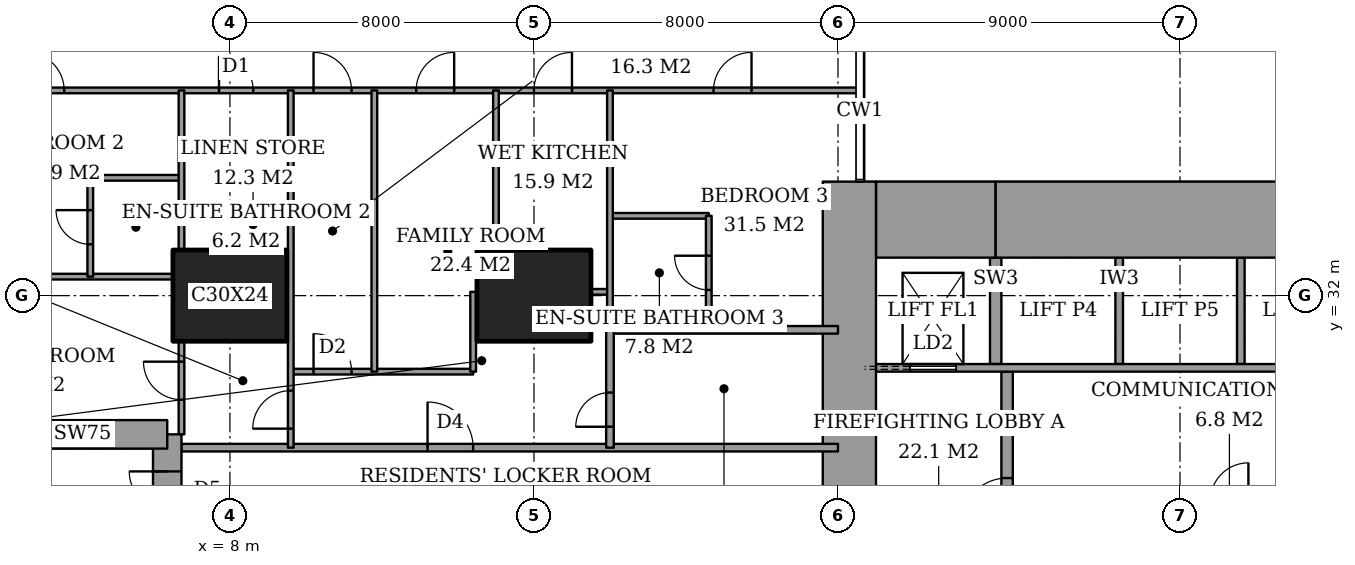
"""IFC4 building model, lengths in metres.
Left out: names, types, materials, properties, quantities, classifications, styles, units other than length and angle.
Written with IfcOpenShell. Run it as: python <this file> out.ifc"""

import sys

from ifc_helpers import new_model, si_unit, direction, frame, frame_2d, origin, origin_2d, place, context, subcontext, project, spatial, rectangle, extrude, element, fill, save


model = new_model("IFC4")
c1 = context("Model", 3, precision=1e-05, world=origin(), true_north=direction((0.0, 1.0)))
c2 = subcontext(c1, "Body", "Model", "MODEL_VIEW")
j1 = project(units=[si_unit("LENGTHUNIT", "METRE"), si_unit("PLANEANGLEUNIT", "RADIAN")], contexts=[c1])
p1 = place(None, origin())
s1 = spatial("IfcSite", under=j1, at=p1, CompositionType="ELEMENT")
p2 = place(p1, origin())
s2 = spatial("IfcBuilding", under=s1, at=p2, CompositionType="ELEMENT")
p3 = place(p2, frame((0.0, 0.0, 44.0)))
s3 = spatial("IfcBuildingStorey", under=s2, at=p3, CompositionType="ELEMENT", Elevation=44.0)
for number, where, z_axis, x_axis in (
    (1, (8.0, 32.0, 0.0), (0.0, 0.0, 1.0), (1.0, 0.0, 0.0)),
    (2, (16.0, 32.0, 0.0), (0.0, 0.0, 1.0), (1.0, 0.0, 0.0)),
):
    element("IfcColumn", number, at=place(p3, frame(where, z_axis=z_axis, x_axis=x_axis)), inside=s3, PredefinedType="COLUMN", context=c2, shape_type="SweptSolid", body=[
        extrude(rectangle(XDim=3.0, YDim=2.4, at=origin_2d()), origin(), (0.0, 0.0, 1.0), 3.6),
    ])
p4 = place(p3, frame((25.0, 34.0, 0.0), z_axis=(0.0, 0.0, 1.0), x_axis=(1.0, 0.0, 0.0)))
e3 = element("IfcWall", 3, at=p4, inside=s3, PredefinedType="SHEAR", context=c2, shape_type="SweptSolid", body=[
    extrude(rectangle(XDim=3.15, YDim=2.0, at=frame_2d((1.575, 0.0))), origin(), (0.0, 0.0, 1.0), 3.6),
])
p5 = place(p3, frame((28.15, 34.0, 0.0), z_axis=(0.0, 0.0, 1.0), x_axis=(1.0, 0.0, 0.0)))
e4 = element("IfcWall", 4, at=p5, inside=s3, PredefinedType="SHEAR", context=c2, shape_type="SweptSolid", body=[
    extrude(rectangle(XDim=9.7, YDim=2.0, at=frame_2d((4.85, 0.0))), origin(), (0.0, 0.0, 1.0), 3.6),
])
p6 = place(p3, frame((24.3, 23.15, 0.0), z_axis=(0.0, 0.0, 1.0), x_axis=(0.0, 1.0, 0.0)))
e5 = element("IfcWall", 5, at=p6, inside=s3, PredefinedType="SHEAR", context=c2, shape_type="SweptSolid", body=[
    extrude(rectangle(XDim=11.85, YDim=1.4, at=frame_2d((5.925, 0.0))), origin(), (0.0, 0.0, 1.0), 3.6),
])
p7 = place(p6, frame((0.75, 0.0, 0.0)))
e6 = element("IfcOpeningElement", 6, at=p7, cuts=e5, PredefinedType="OPENING", context=c2, shape_type="SweptSolid", body=[
    extrude(rectangle(XDim=1.8, YDim=2.4, at=frame_2d((0.9, 1.2))), frame((0.0, 0.71, 0.0), z_axis=(0.0, -1.0, 0.0), x_axis=(1.0, 0.0, 0.0)), (0.0, 0.0, 1.0), 1.42),
])
p8 = place(p3, frame((28.45, 23.3, 0.0), z_axis=(0.0, 0.0, 1.0), x_axis=(0.0, 1.0, 0.0)))
e7 = element("IfcWall", 7, at=p8, inside=s3, PredefinedType="PARTITIONING", context=c2, shape_type="SweptSolid", body=[
    extrude(rectangle(XDim=6.7, YDim=0.3, at=frame_2d((3.35, 0.0))), origin(), (0.0, 0.0, 1.0), 3.6),
])
p9 = place(p8, frame((2.7, 0.0, 0.0)))
e8 = element("IfcOpeningElement", 8, at=p9, cuts=e7, PredefinedType="OPENING", context=c2, shape_type="SweptSolid", body=[
    extrude(rectangle(XDim=1.2, YDim=2.1, at=frame_2d((0.6, 1.05))), frame((0.0, 0.16, 0.0), z_axis=(0.0, -1.0, 0.0), x_axis=(1.0, 0.0, 0.0)), (0.0, 0.0, 1.0), 0.32),
])
p10 = place(p3, frame((6.35, 19.65, 0.0), z_axis=(0.0, 0.0, 1.0), x_axis=(0.0, 1.0, 0.0)))
e9 = element("IfcWall", 9, at=p10, inside=s3, PredefinedType="SHEAR", context=c2, shape_type="SweptSolid", body=[
    extrude(rectangle(XDim=8.7, YDim=0.75, at=frame_2d((4.35, 0.0))), origin(), (0.0, 0.0, 1.0), 3.6),
])
p11 = place(p10, frame((6.725, 0.0, 0.0)))
e10 = element("IfcOpeningElement", 10, at=p11, cuts=e9, PredefinedType="OPENING", context=c2, shape_type="SweptSolid", body=[
    extrude(rectangle(XDim=1.0, YDim=2.1, at=frame_2d((0.5, 1.05))), frame((0.0, 0.385, 0.0), z_axis=(0.0, -1.0, 0.0), x_axis=(1.0, 0.0, 0.0)), (0.0, 0.0, 1.0), 0.77),
])
p12 = place(p3, frame((6.35, 28.35, 0.0), z_axis=(0.0, 0.0, 1.0), x_axis=(-1.0, 0.0, 0.0)))
e11 = element("IfcWall", 11, at=p12, inside=s3, PredefinedType="SHEAR", context=c2, shape_type="SweptSolid", body=[
    extrude(rectangle(XDim=4.45, YDim=0.75, at=frame_2d((2.225, 0.0))), origin(), (0.0, 0.0, 1.0), 3.6),
])
p13 = place(p3, frame((6.725, 28.0, 0.0), z_axis=(0.0, 0.0, 1.0), x_axis=(1.0, 0.0, 0.0)))
e12 = element("IfcWall", 12, at=p13, inside=s3, PredefinedType="PARTITIONING", context=c2, shape_type="SweptSolid", body=[
    extrude(rectangle(XDim=17.275, YDim=0.2, at=frame_2d((8.637, 0.0))), origin(), (0.0, 0.0, 1.0), 3.35),
])
p14 = place(p13, frame((6.475, 0.0, 0.0)))
e13 = element("IfcOpeningElement", 13, at=p14, cuts=e12, PredefinedType="OPENING", context=c2, shape_type="SweptSolid", body=[
    extrude(rectangle(XDim=1.2, YDim=2.4, at=frame_2d((0.6, 1.2))), frame((0.0, 0.11, 0.0), z_axis=(0.0, -1.0, 0.0), x_axis=(1.0, 0.0, 0.0)), (0.0, 0.0, 1.0), 0.22),
])
p15 = place(p3, frame((9.6, 30.0, 0.0), z_axis=(0.0, 0.0, 1.0), x_axis=(1.0, 0.0, 0.0)))
e14 = element("IfcWall", 14, at=p15, inside=s3, PredefinedType="PARTITIONING", context=c2, shape_type="SweptSolid", body=[
    extrude(rectangle(XDim=4.8, YDim=0.15, at=frame_2d((2.4, 0.0))), origin(), (0.0, 0.0, 1.0), 3.35),
])
p16 = place(p15, frame((0.6, 0.0, 0.0)))
e15 = element("IfcOpeningElement", 15, at=p16, cuts=e14, PredefinedType="OPENING", context=c2, shape_type="SweptSolid", body=[
    extrude(rectangle(XDim=1.0, YDim=2.1, at=frame_2d((0.5, 1.05))), frame((0.0, 0.085, 0.0), z_axis=(0.0, -1.0, 0.0), x_axis=(1.0, 0.0, 0.0)), (0.0, 0.0, 1.0), 0.17),
])
p17 = place(p3, frame((18.0, 31.1, 0.0), z_axis=(0.0, 0.0, 1.0), x_axis=(1.0, 0.0, 0.0)))
e16 = element("IfcWall", 16, at=p17, inside=s3, PredefinedType="PARTITIONING", context=c2, shape_type="SweptSolid", body=[
    extrude(rectangle(XDim=6.0, YDim=0.2, at=frame_2d((3.0, 0.0))), origin(), (0.0, 0.0, 1.0), 3.35),
])
p18 = place(p3, frame((17.5, 32.1, 0.0), z_axis=(0.0, 0.0, 1.0), x_axis=(1.0, 0.0, 0.0)))
e17 = element("IfcWall", 17, at=p18, inside=s3, PredefinedType="PARTITIONING", context=c2, shape_type="SweptSolid", body=[
    extrude(rectangle(XDim=0.5, YDim=0.15, at=frame_2d((0.25, 0.0))), origin(), (0.0, 0.0, 1.0), 2.634),
])
p19 = place(p3, frame((1.35, 32.5, 0.0), z_axis=(0.0, 0.0, 1.0), x_axis=(1.0, 0.0, 0.0)))
e18 = element("IfcWall", 18, at=p19, inside=s3, PredefinedType="PARTITIONING", context=c2, shape_type="SweptSolid", body=[
    extrude(rectangle(XDim=5.15, YDim=0.15, at=frame_2d((2.575, 0.0))), origin(), (0.0, 0.0, 1.0), 3.35),
])
p20 = place(p3, frame((18.0, 34.1, 0.0), z_axis=(0.0, 0.0, 1.0), x_axis=(1.0, 0.0, 0.0)))
e19 = element("IfcWall", 19, at=p20, inside=s3, PredefinedType="PARTITIONING", context=c2, shape_type="SweptSolid", body=[
    extrude(rectangle(XDim=2.6, YDim=0.15, at=frame_2d((1.3, 0.0))), origin(), (0.0, 0.0, 1.0), 3.35),
])
p21 = place(p3, frame((4.325, 35.1, 0.0), z_axis=(0.0, 0.0, 1.0), x_axis=(1.0, 0.0, 0.0)))
e20 = element("IfcWall", 20, at=p21, inside=s3, PredefinedType="PARTITIONING", context=c2, shape_type="SweptSolid", body=[
    extrude(rectangle(XDim=2.4, YDim=0.15, at=frame_2d((1.2, 0.0))), origin(), (0.0, 0.0, 1.0), 3.35),
])
p22 = place(p3, frame((-0.45, 37.4, 0.0), z_axis=(0.0, 0.0, 1.0), x_axis=(1.0, 0.0, 0.0)))
e21 = element("IfcWall", 21, at=p22, inside=s3, PredefinedType="PARTITIONING", context=c2, shape_type="SweptSolid", body=[
    extrude(rectangle(XDim=25.011, YDim=0.15, at=frame_2d((12.505, 0.0))), origin(), (0.0, 0.0, 1.0), 3.35),
])
p23 = place(p22, frame((10.65, 0.0, 0.0)))
e22 = element("IfcOpeningElement", 22, at=p23, cuts=e21, PredefinedType="OPENING", context=c2, shape_type="SweptSolid", body=[
    extrude(rectangle(XDim=1.0, YDim=2.1, at=frame_2d((0.5, 1.05))), frame((0.0, 0.085, 0.0), z_axis=(0.0, -1.0, 0.0), x_axis=(1.0, 0.0, 0.0)), (0.0, 0.0, 1.0), 0.17),
])
p24 = place(p22, frame((3.087, 0.0, 0.0)))
e23 = element("IfcOpeningElement", 23, at=p24, cuts=e21, PredefinedType="OPENING", context=c2, shape_type="SweptSolid", body=[
    extrude(rectangle(XDim=1.0, YDim=2.1, at=frame_2d((0.5, 1.05))), frame((0.0, 0.085, 0.0), z_axis=(0.0, -1.0, 0.0), x_axis=(1.0, 0.0, 0.0)), (0.0, 0.0, 1.0), 0.17),
])
p25 = place(p22, frame((8.163, 0.0, 0.0)))
e24 = element("IfcOpeningElement", 24, at=p25, cuts=e21, PredefinedType="OPENING", context=c2, shape_type="SweptSolid", body=[
    extrude(rectangle(XDim=0.9, YDim=2.1, at=frame_2d((0.45, 1.05))), frame((0.0, 0.085, 0.0), z_axis=(0.0, -1.0, 0.0), x_axis=(1.0, 0.0, 0.0)), (0.0, 0.0, 1.0), 0.17),
])
p26 = place(p22, frame((13.35, 0.0, 0.0)))
e25 = element("IfcOpeningElement", 25, at=p26, cuts=e21, PredefinedType="OPENING", context=c2, shape_type="SweptSolid", body=[
    extrude(rectangle(XDim=1.0, YDim=2.1, at=frame_2d((0.5, 1.05))), frame((0.0, 0.085, 0.0), z_axis=(0.0, -1.0, 0.0), x_axis=(1.0, 0.0, 0.0)), (0.0, 0.0, 1.0), 0.17),
])
p27 = place(p22, frame((16.45, 0.0, 0.0)))
e26 = element("IfcOpeningElement", 26, at=p27, cuts=e21, PredefinedType="OPENING", context=c2, shape_type="SweptSolid", body=[
    extrude(rectangle(XDim=1.0, YDim=2.1, at=frame_2d((0.5, 1.05))), frame((0.0, 0.085, 0.0), z_axis=(0.0, -1.0, 0.0), x_axis=(1.0, 0.0, 0.0)), (0.0, 0.0, 1.0), 0.17),
])
p28 = place(p22, frame((21.175, 0.0, 0.0)))
e27 = element("IfcOpeningElement", 27, at=p28, cuts=e21, PredefinedType="OPENING", context=c2, shape_type="SweptSolid", body=[
    extrude(rectangle(XDim=1.0, YDim=2.1, at=frame_2d((0.5, 1.05))), frame((0.0, 0.085, 0.0), z_axis=(0.0, -1.0, 0.0), x_axis=(1.0, 0.0, 0.0)), (0.0, 0.0, 1.0), 0.17),
])
p29 = place(p3, frame((4.325, 32.5, 0.0), z_axis=(0.0, 0.0, 1.0), x_axis=(0.0, 1.0, 0.0)))
e28 = element("IfcWall", 28, at=p29, inside=s3, PredefinedType="PARTITIONING", context=c2, shape_type="SweptSolid", body=[
    extrude(rectangle(XDim=2.6, YDim=0.15, at=frame_2d((1.3, 0.0))), origin(), (0.0, 0.0, 1.0), 3.35),
])
p30 = place(p29, frame((0.85, 0.0, 0.0)))
e29 = element("IfcOpeningElement", 29, at=p30, cuts=e28, PredefinedType="OPENING", context=c2, shape_type="SweptSolid", body=[
    extrude(rectangle(XDim=0.9, YDim=2.1, at=frame_2d((0.45, 1.05))), frame((0.0, 0.085, 0.0), z_axis=(0.0, -1.0, 0.0), x_axis=(1.0, 0.0, 0.0)), (0.0, 0.0, 1.0), 0.17),
])
p31 = place(p3, frame((6.725, 28.35, 0.0), z_axis=(0.0, 0.0, 1.0), x_axis=(0.0, 1.0, 0.0)))
e30 = element("IfcWall", 30, at=p31, inside=s3, PredefinedType="PARTITIONING", context=c2, shape_type="SweptSolid", body=[
    extrude(rectangle(XDim=2.45, YDim=0.15, at=frame_2d((1.225, 0.0))), origin(), (0.0, 0.0, 1.0), 3.35),
])
p32 = place(p31, frame((0.913, 0.0, 0.0)))
e31 = element("IfcOpeningElement", 31, at=p32, cuts=e30, PredefinedType="OPENING", context=c2, shape_type="SweptSolid", body=[
    extrude(rectangle(XDim=1.0, YDim=2.1, at=frame_2d((0.5, 1.05))), frame((0.0, 0.085, 0.0), z_axis=(0.0, -1.0, 0.0), x_axis=(1.0, 0.0, 0.0)), (0.0, 0.0, 1.0), 0.17),
])
p33 = place(p3, frame((6.725, 33.2, 0.0), z_axis=(0.0, 0.0, 1.0), x_axis=(0.0, 1.0, 0.0)))
e32 = element("IfcWall", 32, at=p33, inside=s3, PredefinedType="PARTITIONING", context=c2, shape_type="SweptSolid", body=[
    extrude(rectangle(XDim=4.2, YDim=0.15, at=frame_2d((2.1, 0.0))), origin(), (0.0, 0.0, 1.0), 3.35),
])
p34 = place(p3, frame((9.6, 28.0, 0.0), z_axis=(0.0, 0.0, 1.0), x_axis=(0.0, 1.0, 0.0)))
e33 = element("IfcWall", 33, at=p34, inside=s3, PredefinedType="PARTITIONING", context=c2, shape_type="SweptSolid", body=[
    extrude(rectangle(XDim=9.4, YDim=0.15, at=frame_2d((4.7, 0.0))), origin(), (0.0, 0.0, 1.0), 3.35),
])
p35 = place(p34, frame((0.5, 0.0, 0.0)))
e34 = element("IfcOpeningElement", 34, at=p35, cuts=e33, PredefinedType="OPENING", context=c2, shape_type="SweptSolid", body=[
    extrude(rectangle(XDim=1.0, YDim=2.1, at=frame_2d((0.5, 1.05))), frame((0.0, 0.085, 0.0), z_axis=(0.0, -1.0, 0.0), x_axis=(1.0, 0.0, 0.0)), (0.0, 0.0, 1.0), 0.17),
])
p36 = place(p3, frame((11.8, 30.0, 0.0), z_axis=(0.0, 0.0, 1.0), x_axis=(0.0, 1.0, 0.0)))
e35 = element("IfcWall", 35, at=p36, inside=s3, PredefinedType="PARTITIONING", context=c2, shape_type="SweptSolid", body=[
    extrude(rectangle(XDim=7.4, YDim=0.15, at=frame_2d((3.7, 0.0))), origin(), (0.0, 0.0, 1.0), 3.35),
])
p37 = place(p3, frame((14.4, 30.0, 0.0), z_axis=(0.0, 0.0, 1.0), x_axis=(0.0, 1.0, 0.0)))
e36 = element("IfcWall", 36, at=p37, inside=s3, PredefinedType="PARTITIONING", context=c2, shape_type="SweptSolid", body=[
    extrude(rectangle(XDim=2.1, YDim=0.15, at=frame_2d((1.05, 0.0))), origin(), (0.0, 0.0, 1.0), 3.35),
])
p38 = place(p3, frame((15.0, 33.2, 0.0), z_axis=(0.0, 0.0, 1.0), x_axis=(0.0, 1.0, 0.0)))
e37 = element("IfcWall", 37, at=p38, inside=s3, PredefinedType="PARTITIONING", context=c2, shape_type="SweptSolid", body=[
    extrude(rectangle(XDim=4.2, YDim=0.15, at=frame_2d((2.1, 0.0))), origin(), (0.0, 0.0, 1.0), 3.35),
])
p39 = place(p3, frame((18.0, 28.0, 0.0), z_axis=(0.0, 0.0, 1.0), x_axis=(0.0, 1.0, 0.0)))
e38 = element("IfcWall", 38, at=p39, inside=s3, PredefinedType="PARTITIONING", context=c2, shape_type="SweptSolid", body=[
    extrude(rectangle(XDim=3.1, YDim=0.2, at=frame_2d((1.55, 0.0))), origin(), (0.0, 0.0, 1.0), 3.35),
])
p40 = place(p39, frame((0.55, 0.0, 0.0)))
e39 = element("IfcOpeningElement", 39, at=p40, cuts=e38, PredefinedType="OPENING", context=c2, shape_type="SweptSolid", body=[
    extrude(rectangle(XDim=0.9, YDim=2.1, at=frame_2d((0.45, 1.05))), frame((0.0, 0.11, 0.0), z_axis=(0.0, -1.0, 0.0), x_axis=(1.0, 0.0, 0.0)), (0.0, 0.0, 1.0), 0.22),
])
p41 = place(p3, frame((18.0, 31.1, 0.0), z_axis=(0.0, 0.0, 1.0), x_axis=(0.0, 1.0, 0.0)))
e40 = element("IfcWall", 40, at=p41, inside=s3, PredefinedType="PARTITIONING", context=c2, shape_type="SweptSolid", body=[
    extrude(rectangle(XDim=6.3, YDim=0.15, at=frame_2d((3.15, 0.0))), origin(), (0.0, 0.0, 1.0), 3.35),
])
p42 = place(p3, frame((20.6, 31.1, 0.0), z_axis=(0.0, 0.0, 1.0), x_axis=(0.0, 1.0, 0.0)))
e41 = element("IfcWall", 41, at=p42, inside=s3, PredefinedType="PARTITIONING", context=c2, shape_type="SweptSolid", body=[
    extrude(rectangle(XDim=3.0, YDim=0.15, at=frame_2d((1.5, 0.0))), origin(), (0.0, 0.0, 1.0), 3.35),
])
p43 = place(p42, frame((1.05, 0.0, 0.0)))
e42 = element("IfcOpeningElement", 42, at=p43, cuts=e41, PredefinedType="OPENING", context=c2, shape_type="SweptSolid", body=[
    extrude(rectangle(XDim=0.9, YDim=2.1, at=frame_2d((0.45, 1.05))), frame((0.0, 0.085, 0.0), z_axis=(0.0, -1.0, 0.0), x_axis=(1.0, 0.0, 0.0)), (0.0, 0.0, 1.0), 0.17),
])
p44 = place(p3, frame((25.0, 30.1, 0.0), z_axis=(0.0, 0.0, 1.0), x_axis=(1.0, 0.0, 0.0)))
e43 = element("IfcWall", 43, at=p44, inside=s3, PredefinedType="PARTITIONING", context=c2, shape_type="SweptSolid", body=[
    extrude(rectangle(XDim=12.7, YDim=0.2, at=frame_2d((6.35, 0.0))), origin(), (0.0, 0.0, 1.0), 3.6),
])
p45 = place(p44, frame((0.9, 0.0, 0.0)))
e44 = element("IfcOpeningElement", 44, at=p45, cuts=e43, PredefinedType="OPENING", context=c2, shape_type="SweptSolid", body=[
    extrude(rectangle(XDim=1.2, YDim=2.1, at=frame_2d((0.6, 1.05))), frame((0.0, 0.11, 0.0), z_axis=(0.0, -1.0, 0.0), x_axis=(1.0, 0.0, 0.0)), (0.0, 0.0, 1.0), 0.22),
])
for number, where, z_axis, x_axis in (
    (45, (31.4, 30.2, 0.0), (0.0, 0.0, 1.0), (0.0, 1.0, 0.0)),
    (46, (34.6, 30.2, 0.0), (0.0, 0.0, 1.0), (0.0, 1.0, 0.0)),
):
    element("IfcWall", number, at=place(p3, frame(where, z_axis=z_axis, x_axis=x_axis)), inside=s3, PredefinedType="PARTITIONING", context=c2, shape_type="SweptSolid", body=[
        extrude(rectangle(XDim=2.8, YDim=0.2, at=frame_2d((1.4, 0.0))), origin(), (0.0, 0.0, 1.0), 3.6),
    ])
p46 = place(p3, frame((28.15, 30.2, 0.0), z_axis=(0.0, 0.0, 1.0), x_axis=(0.0, 1.0, 0.0)))
e47 = element("IfcWall", 47, at=p46, inside=s3, PredefinedType="SHEAR", context=c2, shape_type="SweptSolid", body=[
    extrude(rectangle(XDim=2.8, YDim=0.3, at=frame_2d((1.4, 0.0))), origin(), (0.0, 0.0, 1.0), 3.6),
])
p47 = place(p23, origin())
e48 = element("IfcDoor", 48, at=p47, inside=s3, OperationType="SINGLE_SWING_RIGHT", PredefinedType="DOOR", context=c2, shape_type="SweptSolid", body=[
    extrude(rectangle(XDim=1.0, YDim=2.1, at=frame_2d((0.5, 1.05))), frame((0.0, 0.025, 0.0), z_axis=(0.0, -1.0, 0.0), x_axis=(1.0, 0.0, 0.0)), (0.0, 0.0, 1.0), 0.05),
])
fill(e22, e48)
p48 = place(p30, origin())
e49 = element("IfcDoor", 49, at=p48, inside=s3, OperationType="SINGLE_SWING_LEFT", PredefinedType="DOOR", context=c2, shape_type="SweptSolid", body=[
    extrude(rectangle(XDim=0.9, YDim=2.1, at=frame_2d((0.45, 1.05))), frame((0.0, 0.025, 0.0), z_axis=(0.0, -1.0, 0.0), x_axis=(1.0, 0.0, 0.0)), (0.0, 0.0, 1.0), 0.05),
])
fill(e29, e49)
p49 = place(p24, origin())
e50 = element("IfcDoor", 50, at=p49, inside=s3, OperationType="SINGLE_SWING_RIGHT", PredefinedType="DOOR", context=c2, shape_type="SweptSolid", body=[
    extrude(rectangle(XDim=1.0, YDim=2.1, at=frame_2d((0.5, 1.05))), frame((0.0, 0.025, 0.0), z_axis=(0.0, -1.0, 0.0), x_axis=(1.0, 0.0, 0.0)), (0.0, 0.0, 1.0), 0.05),
])
fill(e23, e50)
p50 = place(p32, origin())
e51 = element("IfcDoor", 51, at=p50, inside=s3, OperationType="SINGLE_SWING_LEFT", PredefinedType="DOOR", context=c2, shape_type="SweptSolid", body=[
    extrude(rectangle(XDim=1.0, YDim=2.1, at=frame_2d((0.5, 1.05))), frame((0.0, 0.025, 0.0), z_axis=(0.0, -1.0, 0.0), x_axis=(1.0, 0.0, 0.0)), (0.0, 0.0, 1.0), 0.05),
])
fill(e31, e51)
p51 = place(p25, origin())
e52 = element("IfcDoor", 52, at=p51, inside=s3, OperationType="SINGLE_SWING_RIGHT", PredefinedType="DOOR", context=c2, shape_type="SweptSolid", body=[
    extrude(rectangle(XDim=0.9, YDim=2.1, at=frame_2d((0.45, 1.05))), frame((0.0, 0.025, 0.0), z_axis=(0.0, -1.0, 0.0), x_axis=(1.0, 0.0, 0.0)), (0.0, 0.0, 1.0), 0.05),
])
fill(e24, e52)
p52 = place(p35, origin())
e53 = element("IfcDoor", 53, at=p52, inside=s3, OperationType="SINGLE_SWING_RIGHT", PredefinedType="DOOR", context=c2, shape_type="SweptSolid", body=[
    extrude(rectangle(XDim=1.0, YDim=2.1, at=frame_2d((0.5, 1.05))), frame((0.0, 0.025, 0.0), z_axis=(0.0, -1.0, 0.0), x_axis=(1.0, 0.0, 0.0)), (0.0, 0.0, 1.0), 0.05),
])
fill(e34, e53)
p53 = place(p14, origin())
e54 = element("IfcDoor", 54, at=p53, inside=s3, OperationType="SINGLE_SWING_RIGHT", PredefinedType="DOOR", context=c2, shape_type="SweptSolid", body=[
    extrude(rectangle(XDim=1.2, YDim=2.4, at=frame_2d((0.6, 1.2))), frame((0.0, 0.025, 0.0), z_axis=(0.0, -1.0, 0.0), x_axis=(1.0, 0.0, 0.0)), (0.0, 0.0, 1.0), 0.05),
])
fill(e13, e54)
p54 = place(p16, origin())
e55 = element("IfcDoor", 55, at=p54, inside=s3, OperationType="SINGLE_SWING_RIGHT", PredefinedType="DOOR", context=c2, shape_type="SweptSolid", body=[
    extrude(rectangle(XDim=1.0, YDim=2.1, at=frame_2d((0.5, 1.05))), frame((0.0, 0.025, 0.0), z_axis=(0.0, -1.0, 0.0), x_axis=(1.0, 0.0, 0.0)), (0.0, 0.0, 1.0), 0.05),
])
fill(e15, e55)
p55 = place(p26, origin())
e56 = element("IfcDoor", 56, at=p55, inside=s3, OperationType="SINGLE_SWING_LEFT", PredefinedType="DOOR", context=c2, shape_type="SweptSolid", body=[
    extrude(rectangle(XDim=1.0, YDim=2.1, at=frame_2d((0.5, 1.05))), frame((0.0, 0.025, 0.0), z_axis=(0.0, -1.0, 0.0), x_axis=(1.0, 0.0, 0.0)), (0.0, 0.0, 1.0), 0.05),
])
fill(e25, e56)
p56 = place(p27, origin())
e57 = element("IfcDoor", 57, at=p56, inside=s3, OperationType="SINGLE_SWING_LEFT", PredefinedType="DOOR", context=c2, shape_type="SweptSolid", body=[
    extrude(rectangle(XDim=1.0, YDim=2.1, at=frame_2d((0.5, 1.05))), frame((0.0, 0.025, 0.0), z_axis=(0.0, -1.0, 0.0), x_axis=(1.0, 0.0, 0.0)), (0.0, 0.0, 1.0), 0.05),
])
fill(e26, e57)
p57 = place(p43, origin())
e58 = element("IfcDoor", 58, at=p57, inside=s3, OperationType="SINGLE_SWING_LEFT", PredefinedType="DOOR", context=c2, shape_type="SweptSolid", body=[
    extrude(rectangle(XDim=0.9, YDim=2.1, at=frame_2d((0.45, 1.05))), frame((0.0, 0.025, 0.0), z_axis=(0.0, -1.0, 0.0), x_axis=(1.0, 0.0, 0.0)), (0.0, 0.0, 1.0), 0.05),
])
fill(e42, e58)
p58 = place(p28, origin())
e59 = element("IfcDoor", 59, at=p58, inside=s3, OperationType="SINGLE_SWING_LEFT", PredefinedType="DOOR", context=c2, shape_type="SweptSolid", body=[
    extrude(rectangle(XDim=1.0, YDim=2.1, at=frame_2d((0.5, 1.05))), frame((0.0, 0.025, 0.0), z_axis=(0.0, -1.0, 0.0), x_axis=(1.0, 0.0, 0.0)), (0.0, 0.0, 1.0), 0.05),
])
fill(e27, e59)
p59 = place(p40, origin())
e60 = element("IfcDoor", 60, at=p59, inside=s3, OperationType="SINGLE_SWING_RIGHT", PredefinedType="DOOR", context=c2, shape_type="SweptSolid", body=[
    extrude(rectangle(XDim=0.9, YDim=2.1, at=frame_2d((0.45, 1.05))), frame((0.0, 0.025, 0.0), z_axis=(0.0, -1.0, 0.0), x_axis=(1.0, 0.0, 0.0)), (0.0, 0.0, 1.0), 0.05),
])
fill(e39, e60)
p60 = place(p9, origin())
e61 = element("IfcDoor", 61, at=p60, inside=s3, OperationType="SINGLE_SWING_RIGHT", PredefinedType="DOOR", context=c2, shape_type="SweptSolid", body=[
    extrude(rectangle(XDim=1.2, YDim=2.1, at=frame_2d((0.6, 1.05))), frame((0.0, 0.025, 0.0), z_axis=(0.0, -1.0, 0.0), x_axis=(1.0, 0.0, 0.0)), (0.0, 0.0, 1.0), 0.05),
])
fill(e8, e61)
p61 = place(p45, origin())
e62 = element("IfcDoor", 62, at=p61, inside=s3, OperationType="SLIDING_TO_LEFT", PredefinedType="DOOR", context=c2, shape_type="SweptSolid", body=[
    extrude(rectangle(XDim=1.2, YDim=2.1, at=frame_2d((0.6, 1.05))), frame((0.0, 0.025, 0.0), z_axis=(0.0, -1.0, 0.0), x_axis=(1.0, 0.0, 0.0)), (0.0, 0.0, 1.0), 0.05),
])
fill(e44, e62)
p62 = place(p11, origin())
e63 = element("IfcDoor", 63, at=p62, inside=s3, OperationType="SINGLE_SWING_LEFT", PredefinedType="DOOR", context=c2, shape_type="SweptSolid", body=[
    extrude(rectangle(XDim=1.0, YDim=2.1, at=frame_2d((0.5, 1.05))), frame((0.0, 0.025, 0.0), z_axis=(0.0, -1.0, 0.0), x_axis=(1.0, 0.0, 0.0)), (0.0, 0.0, 1.0), 0.05),
])
fill(e10, e63)
save(model, sys.argv[1])
